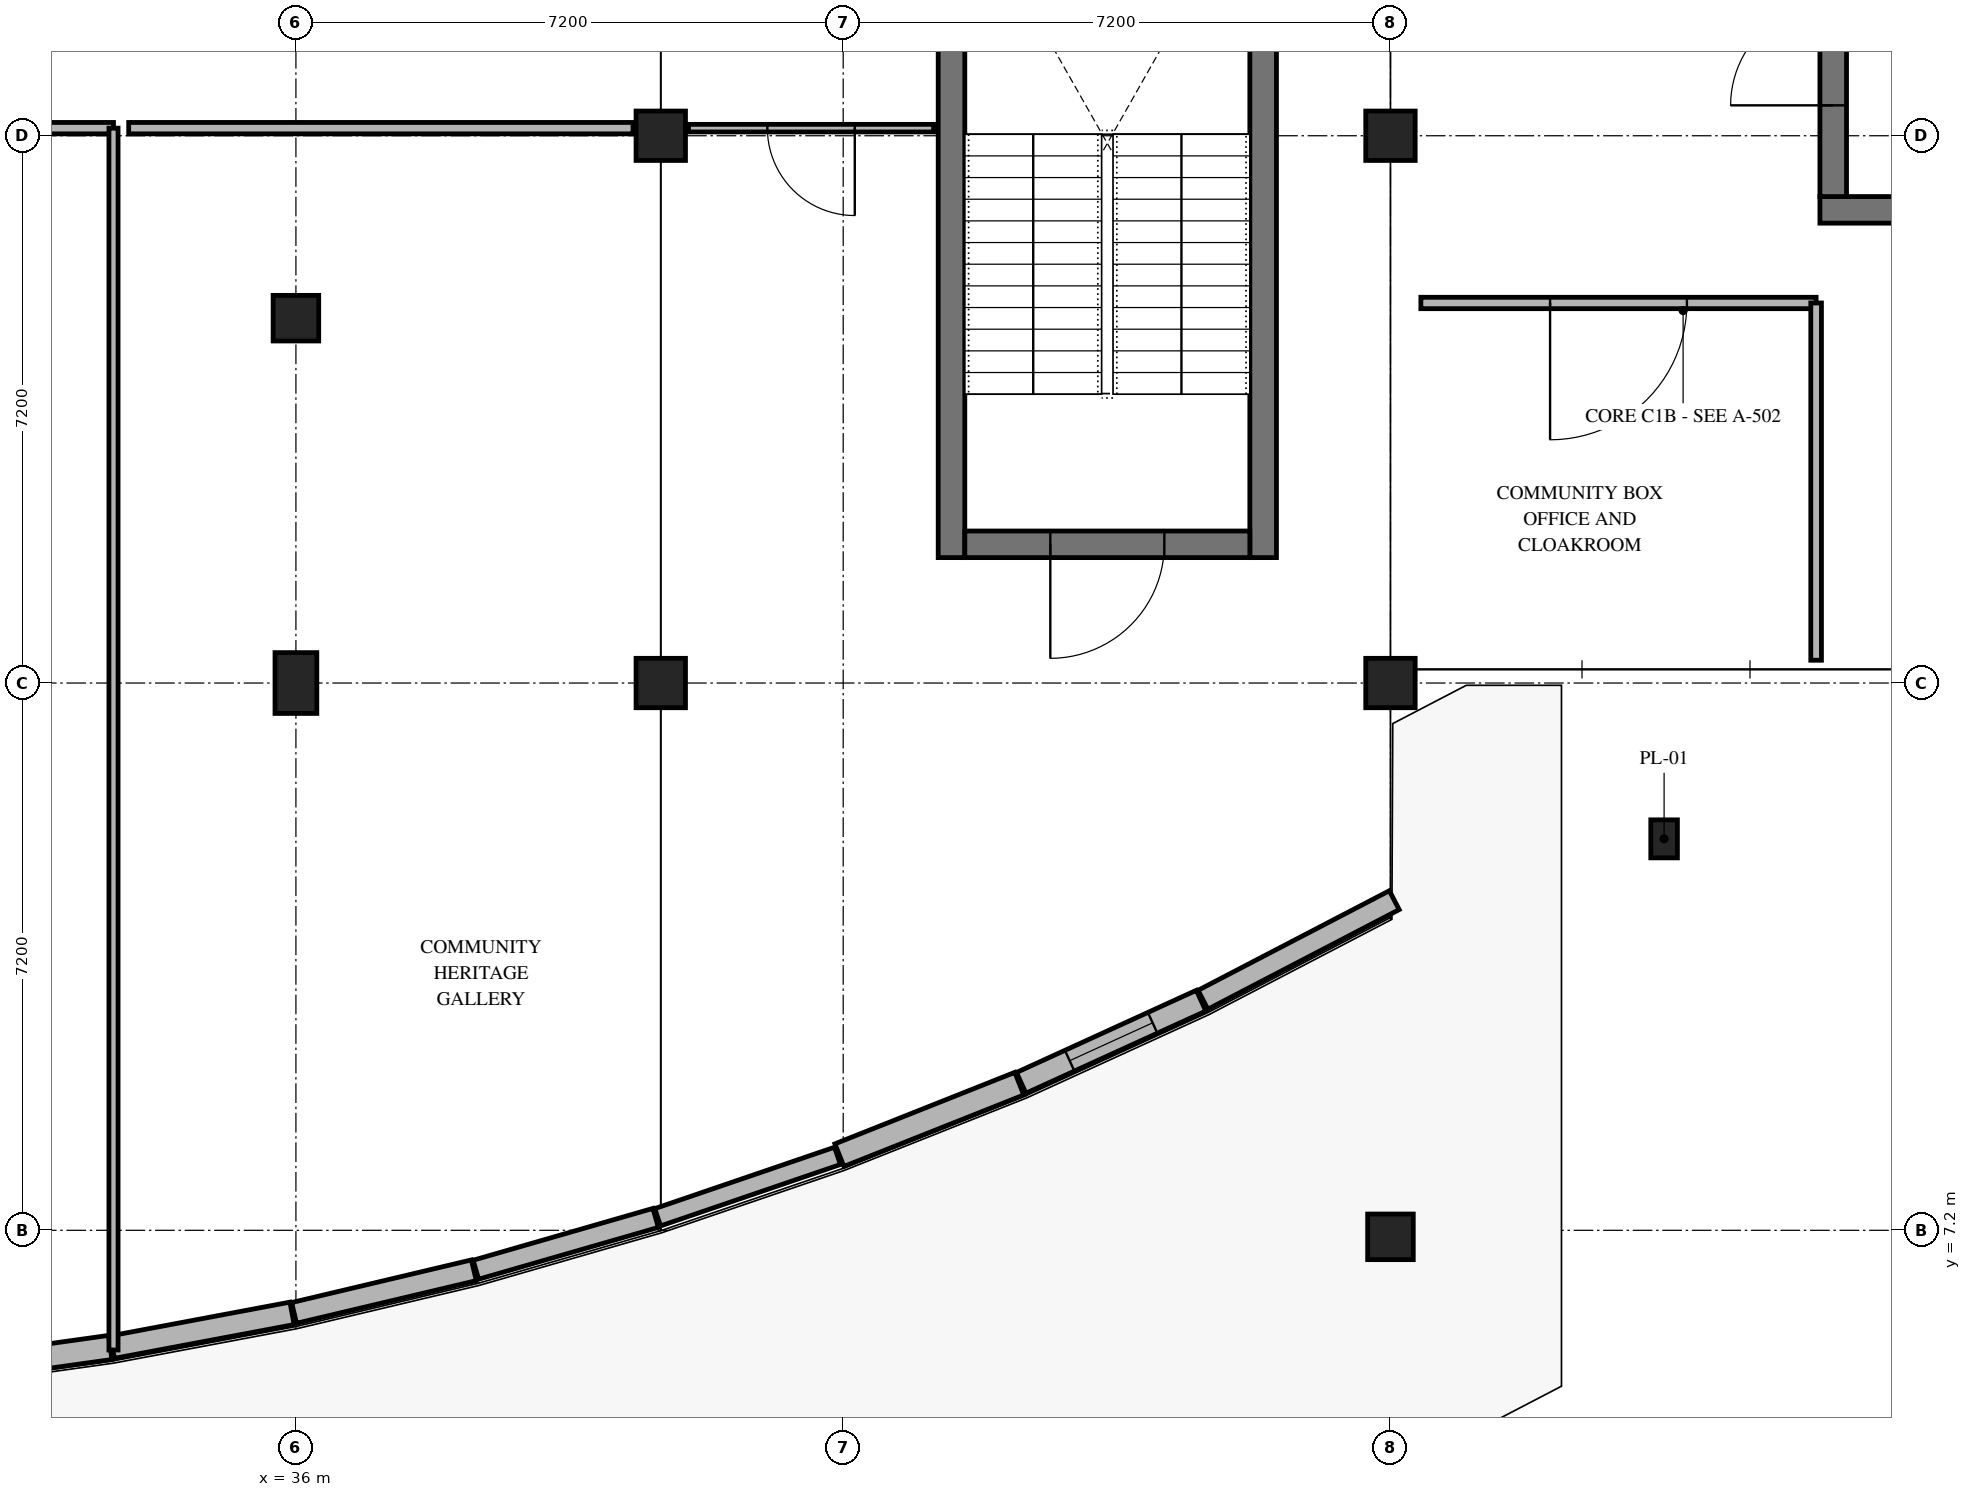
"""IFC4 building model, lengths in metres.
Left out: names, types, materials, properties, quantities, classifications, styles, units other than length and angle.
Written with IfcOpenShell. Run it as: python <this file> out.ifc"""

import sys

from ifc_helpers import new_model, si_unit, direction, frame, frame_2d, origin, origin_2d, place, context, subcontext, project, spatial, rectangle, circle, extrude, element, fill, save


model = new_model("IFC4")
c1 = context("Model", 3, precision=1e-05, world=origin(), true_north=direction((0.0, 1.0)))
c2 = subcontext(c1, "Body", "Model", "MODEL_VIEW")
j1 = project(units=[si_unit("LENGTHUNIT", "METRE"), si_unit("PLANEANGLEUNIT", "RADIAN")], contexts=[c1])
p1 = place(None, origin())
s1 = spatial("IfcSite", under=j1, at=p1, CompositionType="ELEMENT")
p2 = place(p1, origin())
s2 = spatial("IfcBuilding", under=s1, at=p2, CompositionType="ELEMENT")
p3 = place(p2, origin())
s3 = spatial("IfcBuildingStorey", under=s2, at=p3, CompositionType="ELEMENT", Elevation=0.0)
p4 = place(p3, frame((54.0, 12.35, 0.0), z_axis=(0.0, 0.0, 1.0), x_axis=(1.0, 0.0, 0.0)))
e1 = element("IfcColumn", 1, at=p4, inside=s3, PredefinedType="PILASTER", context=c2, shape_type="SweptSolid", body=[
    extrude(rectangle(XDim=0.35, YDim=0.5, at=origin_2d()), origin(), (0.0, 0.0, 1.0), 4.24),
])
p5 = place(p3, frame((50.4, 7.114, 0.0), z_axis=(0.0, 0.0, 1.0), x_axis=(1.0, 0.0, 0.0)))
e2 = element("IfcColumn", 2, at=p5, inside=s3, PredefinedType="COLUMN", context=c2, shape_type="SweptSolid", body=[
    extrude(circle(Radius=0.3, at=origin_2d()), origin(), (0.0, 0.0, 1.0), 4.5),
])
for number, where, z_axis, x_axis in (
    (3, (40.8, 14.4, 0.0), (0.0, 0.0, 1.0), (1.0, 0.0, 0.0)),
    (4, (40.8, 21.6, 0.0), (0.0, 0.0, 1.0), (1.0, 0.0, 0.0)),
    (5, (50.4, 14.4, 0.0), (0.0, 0.0, 1.0), (1.0, 0.0, 0.0)),
    (6, (50.4, 21.6, 0.0), (0.0, 0.0, 1.0), (1.0, 0.0, 0.0)),
):
    element("IfcColumn", number, at=place(p3, frame(where, z_axis=z_axis, x_axis=x_axis)), inside=s3, PredefinedType="COLUMN", context=c2, shape_type="SweptSolid", body=[
        extrude(rectangle(XDim=0.65, YDim=0.65, at=origin_2d()), origin(), (0.0, 0.0, 1.0), 4.5),
    ])
p6 = place(p3, frame((36.0, 14.4, 0.0), z_axis=(0.0, 0.0, 1.0), x_axis=(1.0, 0.0, 0.0)))
e7 = element("IfcColumn", 7, at=p6, inside=s3, PredefinedType="COLUMN", context=c2, shape_type="SweptSolid", body=[
    extrude(rectangle(XDim=0.55, YDim=0.8, at=origin_2d()), origin(), (0.0, 0.0, 1.0), 4.5),
])
p7 = place(p3, frame((36.0, 19.2, 0.0), z_axis=(0.0, 0.0, 1.0), x_axis=(1.0, 0.0, 0.0)))
e8 = element("IfcColumn", 8, at=p7, inside=s3, PredefinedType="COLUMN", context=c2, shape_type="SweptSolid", body=[
    extrude(rectangle(XDim=0.6, YDim=0.6, at=origin_2d()), origin(), (0.0, 0.0, 1.0), 4.5),
])
p8 = place(p3, frame((33.557, 5.659, 0.0), z_axis=(0.0, 0.0, 1.0), x_axis=(-0.990368406077, -0.138457286714, 0.0)))
e9 = element("IfcWall", 9, at=p8, inside=s3, PredefinedType="SOLIDWALL", context=c2, shape_type="SweptSolid", body=[
    extrude(rectangle(XDim=2.387, YDim=0.32, at=frame_2d((1.194, 0.0))), origin(), (0.0, 0.0, 1.0), 4.24),
])
p9 = place(p3, frame((35.949, 6.107, 0.0), z_axis=(0.0, 0.0, 1.0), x_axis=(-0.982800895809, -0.184668349202, 0.0)))
e10 = element("IfcWall", 10, at=p9, inside=s3, PredefinedType="SOLIDWALL", context=c2, shape_type="SweptSolid", body=[
    extrude(rectangle(XDim=2.406, YDim=0.3, at=frame_2d((1.203, 0.0))), origin(), (0.0, 0.0, 1.0), 4.24),
])
p10 = place(p3, frame((38.341, 6.674, 0.0), z_axis=(0.0, 0.0, 1.0), x_axis=(-0.972996641293, -0.230819271363, 0.0)))
e11 = element("IfcWall", 11, at=p10, inside=s3, PredefinedType="SOLIDWALL", context=c2, shape_type="SweptSolid", body=[
    extrude(rectangle(XDim=2.431, YDim=0.28, at=frame_2d((1.215, 0.0))), origin(), (0.0, 0.0, 1.0), 4.24),
])
p11 = place(p3, frame((40.733, 7.363, 0.0), z_axis=(0.0, 0.0, 1.0), x_axis=(-0.960873855282, -0.276986343049, 0.0)))
e12 = element("IfcWall", 12, at=p11, inside=s3, PredefinedType="SOLIDWALL", context=c2, shape_type="SweptSolid", body=[
    extrude(rectangle(XDim=2.462, YDim=0.26, at=frame_2d((1.231, 0.0))), origin(), (0.0, 0.0, 1.0), 3.64),
])
p12 = place(p3, frame((43.125, 8.179, 0.0), z_axis=(0.0, 0.0, 1.0), x_axis=(-0.946353497829, -0.323133187939, 0.0)))
e13 = element("IfcWall", 13, at=p12, inside=s3, PredefinedType="SOLIDWALL", context=c2, shape_type="SweptSolid", body=[
    extrude(rectangle(XDim=2.5, YDim=0.24, at=frame_2d((1.25, 0.0))), origin(), (0.0, 0.0, 1.0), 3.64),
])
p13 = place(p3, frame((45.517, 9.129, 0.0), z_axis=(0.0, 0.0, 1.0), x_axis=(-0.929287640724, -0.369356847504, 0.0)))
e14 = element("IfcWall", 14, at=p13, inside=s3, PredefinedType="SOLIDWALL", context=c2, shape_type="SweptSolid", body=[
    extrude(rectangle(XDim=2.547, YDim=0.32, at=frame_2d((1.273, 0.0))), origin(), (0.0, 0.0, 1.0), 4.24),
])
p14 = place(p3, frame((47.909, 10.221, 0.0), z_axis=(0.0, 0.0, 1.0), x_axis=(-0.90959706885, -0.415491482873, 0.0)))
e15 = element("IfcWall", 15, at=p14, inside=s3, PredefinedType="SOLIDWALL", context=c2, shape_type="SweptSolid", body=[
    extrude(rectangle(XDim=2.603, YDim=0.3, at=frame_2d((1.301, 0.0))), origin(), (0.0, 0.0, 1.0), 4.24),
])
p15 = place(p14, frame((0.701, 0.0, 0.9)))
e16 = element("IfcOpeningElement", 16, at=p15, cuts=e15, PredefinedType="OPENING", context=c2, shape_type="SweptSolid", body=[
    extrude(rectangle(XDim=1.2, YDim=1.35, at=frame_2d((0.6, 0.675))), frame((0.0, 0.16, 0.0), z_axis=(0.0, -1.0, 0.0), x_axis=(1.0, 0.0, 0.0)), (0.0, 0.0, 1.0), 0.32),
])
p16 = place(p3, frame((50.45, 11.543, 0.0), z_axis=(0.0, 0.0, 1.0), x_axis=(-0.88701246436, -0.46174547975, 0.0)))
e17 = element("IfcWall", 17, at=p16, inside=s3, PredefinedType="SOLIDWALL", context=c2, shape_type="SweptSolid", body=[
    extrude(rectangle(XDim=2.838, YDim=0.28, at=frame_2d((1.419, 0.0))), origin(), (0.0, 0.0, 1.0), 3.54),
])
for number, where, z_axis, x_axis in (
    (18, (48.725, 16.05, 0.0), (0.0, 0.0, 1.0), (0.0, 1.0, 0.0)),
    (19, (44.625, 25.15, 0.0), (0.0, 0.0, 1.0), (0.0, -1.0, 0.0)),
):
    element("IfcWall", number, at=place(p3, frame(where, z_axis=z_axis, x_axis=x_axis)), inside=s3, PredefinedType="SHEAR", context=c2, shape_type="SweptSolid", body=[
        extrude(rectangle(XDim=9.1, YDim=0.35, at=frame_2d((4.55, 0.0))), origin(), (0.0, 0.0, 1.0), 4.24),
    ])
p17 = place(p3, frame((48.55, 16.225, 0.0), z_axis=(0.0, 0.0, 1.0), x_axis=(-1.0, 0.0, 0.0)))
e20 = element("IfcWall", 20, at=p17, inside=s3, PredefinedType="SHEAR", context=c2, shape_type="SweptSolid", body=[
    extrude(rectangle(XDim=3.75, YDim=0.35, at=frame_2d((1.875, 0.0))), origin(), (0.0, 0.0, 1.0), 4.24),
])
p18 = place(p17, frame((1.125, 0.0, 0.0)))
e21 = element("IfcOpeningElement", 21, at=p18, cuts=e20, PredefinedType="OPENING", context=c2, shape_type="SweptSolid", body=[
    extrude(rectangle(XDim=1.5, YDim=2.2, at=frame_2d((0.75, 1.1))), frame((0.0, 0.185, 0.0), z_axis=(0.0, -1.0, 0.0), x_axis=(1.0, 0.0, 0.0)), (0.0, 0.0, 1.0), 0.37),
])
p19 = place(p3, frame((56.05, 20.625, 0.0), z_axis=(0.0, 0.0, 1.0), x_axis=(1.0, 0.0, 0.0)))
e22 = element("IfcWall", 22, at=p19, inside=s3, PredefinedType="SHEAR", context=c2, shape_type="SweptSolid", body=[
    extrude(rectangle(XDim=9.1, YDim=0.35, at=frame_2d((4.55, 0.0))), origin(), (0.0, 0.0, 1.0), 4.24),
])
p20 = place(p3, frame((56.225, 20.8, 0.0), z_axis=(0.0, 0.0, 1.0), x_axis=(0.0, 1.0, 0.0)))
e23 = element("IfcWall", 23, at=p20, inside=s3, PredefinedType="SHEAR", context=c2, shape_type="SweptSolid", body=[
    extrude(rectangle(XDim=3.75, YDim=0.35, at=frame_2d((1.875, 0.0))), origin(), (0.0, 0.0, 1.0), 4.24),
])
p21 = place(p20, frame((1.2, 0.0, 0.0)))
e24 = element("IfcOpeningElement", 24, at=p21, cuts=e23, PredefinedType="OPENING", context=c2, shape_type="SweptSolid", body=[
    extrude(rectangle(XDim=1.35, YDim=2.2, at=frame_2d((0.675, 1.1))), frame((0.0, 0.185, 0.0), z_axis=(0.0, -1.0, 0.0), x_axis=(1.0, 0.0, 0.0)), (0.0, 0.0, 1.0), 0.37),
])
p22 = place(p3, frame((33.6, 21.7, 0.0), z_axis=(0.0, 0.0, 1.0), x_axis=(-1.0, 0.0, 0.0)))
e25 = element("IfcWall", 25, at=p22, inside=s3, PredefinedType="PARTITIONING", context=c2, shape_type="SweptSolid", body=[
    extrude(rectangle(XDim=23.635, YDim=0.15, at=frame_2d((11.817, 0.0))), origin(), (0.0, 0.0, 1.0), 3.44),
])
p23 = place(p22, frame((11.192, 0.0, 0.0)))
e26 = element("IfcOpeningElement", 26, at=p23, cuts=e25, PredefinedType="OPENING", context=c2, shape_type="SweptSolid", body=[
    extrude(rectangle(XDim=1.25, YDim=2.2, at=frame_2d((0.625, 1.1))), frame((0.0, 0.085, 0.0), z_axis=(0.0, -1.0, 0.0), x_axis=(1.0, 0.0, 0.0)), (0.0, 0.0, 1.0), 0.17),
])
p24 = place(p3, frame((33.6, 5.625, 0.0), z_axis=(0.0, 0.0, 1.0), x_axis=(0.0, 1.0, 0.0)))
e27 = element("IfcWall", 27, at=p24, inside=s3, PredefinedType="PARTITIONING", context=c2, shape_type="SweptSolid", body=[
    extrude(rectangle(XDim=16.074, YDim=0.12, at=frame_2d((8.037, 0.0))), origin(), (0.0, 0.0, 1.0), 3.49),
])
p25 = place(p3, frame((44.39, 21.7, 0.0), z_axis=(0.0, 0.0, 1.0), x_axis=(-1.0, 0.0, 0.0)))
e28 = element("IfcWall", 28, at=p25, inside=s3, PredefinedType="PARTITIONING", context=c2, shape_type="SweptSolid", body=[
    extrude(rectangle(XDim=3.225, YDim=0.1, at=frame_2d((1.612, 0.0))), origin(), (0.0, 0.0, 1.0), 4.24),
])
p26 = place(p25, frame((1.038, 0.0, 0.0)))
e29 = element("IfcOpeningElement", 29, at=p26, cuts=e28, PredefinedType="OPENING", context=c2, shape_type="SweptSolid", body=[
    extrude(rectangle(XDim=1.15, YDim=2.15, at=frame_2d((0.575, 1.075))), frame((0.0, 0.06, 0.0), z_axis=(0.0, -1.0, 0.0), x_axis=(1.0, 0.0, 0.0)), (0.0, 0.0, 1.0), 0.12),
])
p27 = place(p3, frame((40.435, 21.7, 0.0), z_axis=(0.0, 0.0, 1.0), x_axis=(-1.0, 0.0, 0.0)))
e30 = element("IfcWall", 30, at=p27, inside=s3, PredefinedType="PARTITIONING", context=c2, shape_type="SweptSolid", body=[
    extrude(rectangle(XDim=6.635, YDim=0.15, at=frame_2d((3.317, 0.0))), origin(), (0.0, 0.0, 1.0), 3.44),
])
p28 = place(p3, frame((56.0, 19.4, 0.0), z_axis=(0.0, 0.0, 1.0), x_axis=(-1.0, 0.0, 0.0)))
e31 = element("IfcWall", 31, at=p28, inside=s3, PredefinedType="PARTITIONING", context=c2, shape_type="SweptSolid", body=[
    extrude(rectangle(XDim=5.2, YDim=0.15, at=frame_2d((2.6, 0.0))), origin(), (0.0, 0.0, 1.0), 4.24),
])
p29 = place(p28, frame((1.7, 0.0, 0.0)))
e32 = element("IfcOpeningElement", 32, at=p29, cuts=e31, PredefinedType="OPENING", context=c2, shape_type="SweptSolid", body=[
    extrude(rectangle(XDim=1.8, YDim=2.3, at=frame_2d((0.9, 1.15))), frame((0.0, 0.085, 0.0), z_axis=(0.0, -1.0, 0.0), x_axis=(1.0, 0.0, 0.0)), (0.0, 0.0, 1.0), 0.17),
])
p30 = place(p3, frame((56.0, 14.7, 0.0), z_axis=(0.0, 0.0, 1.0), x_axis=(0.0, 1.0, 0.0)))
e33 = element("IfcWall", 33, at=p30, inside=s3, PredefinedType="PARTITIONING", context=c2, shape_type="SweptSolid", body=[
    extrude(rectangle(XDim=4.7, YDim=0.14, at=frame_2d((2.35, 0.0))), origin(), (0.0, 0.0, 1.0), 4.24),
])
p31 = place(p15, origin())
e34 = element("IfcWindow", 34, at=p31, inside=s3, PartitioningType="SINGLE_PANEL", PredefinedType="WINDOW", context=c2, shape_type="SweptSolid", body=[
    extrude(rectangle(XDim=1.2, YDim=1.35, at=frame_2d((0.6, 0.675))), frame((0.0, 0.03, 0.0), z_axis=(0.0, -1.0, 0.0), x_axis=(1.0, 0.0, 0.0)), (0.0, 0.0, 1.0), 0.06),
])
fill(e16, e34)
p32 = place(p18, origin())
e35 = element("IfcDoor", 35, at=p32, inside=s3, OperationType="SINGLE_SWING_RIGHT", PredefinedType="DOOR", context=c2, shape_type="SweptSolid", body=[
    extrude(rectangle(XDim=1.5, YDim=2.2, at=frame_2d((0.75, 1.1))), frame((0.0, 0.025, 0.0), z_axis=(0.0, -1.0, 0.0), x_axis=(1.0, 0.0, 0.0)), (0.0, 0.0, 1.0), 0.05),
])
fill(e21, e35)
p33 = place(p21, origin())
e36 = element("IfcDoor", 36, at=p33, inside=s3, OperationType="SINGLE_SWING_LEFT", PredefinedType="DOOR", context=c2, shape_type="SweptSolid", body=[
    extrude(rectangle(XDim=1.35, YDim=2.2, at=frame_2d((0.675, 1.1))), frame((0.0, 0.025, 0.0), z_axis=(0.0, -1.0, 0.0), x_axis=(1.0, 0.0, 0.0)), (0.0, 0.0, 1.0), 0.05),
])
fill(e24, e36)
p34 = place(p26, origin())
e37 = element("IfcDoor", 37, at=p34, inside=s3, OperationType="SINGLE_SWING_LEFT", PredefinedType="DOOR", context=c2, shape_type="SweptSolid", body=[
    extrude(rectangle(XDim=1.15, YDim=2.15, at=frame_2d((0.575, 1.075))), frame((0.0, 0.025, 0.0), z_axis=(0.0, -1.0, 0.0), x_axis=(1.0, 0.0, 0.0)), (0.0, 0.0, 1.0), 0.05),
])
fill(e29, e37)
p35 = place(p29, origin())
e38 = element("IfcDoor", 38, at=p35, inside=s3, OperationType="SINGLE_SWING_RIGHT", PredefinedType="DOOR", context=c2, shape_type="SweptSolid", body=[
    extrude(rectangle(XDim=1.8, YDim=2.3, at=frame_2d((0.9, 1.15))), frame((0.0, 0.025, 0.0), z_axis=(0.0, -1.0, 0.0), x_axis=(1.0, 0.0, 0.0)), (0.0, 0.0, 1.0), 0.05),
])
fill(e32, e38)
save(model, sys.argv[1])
